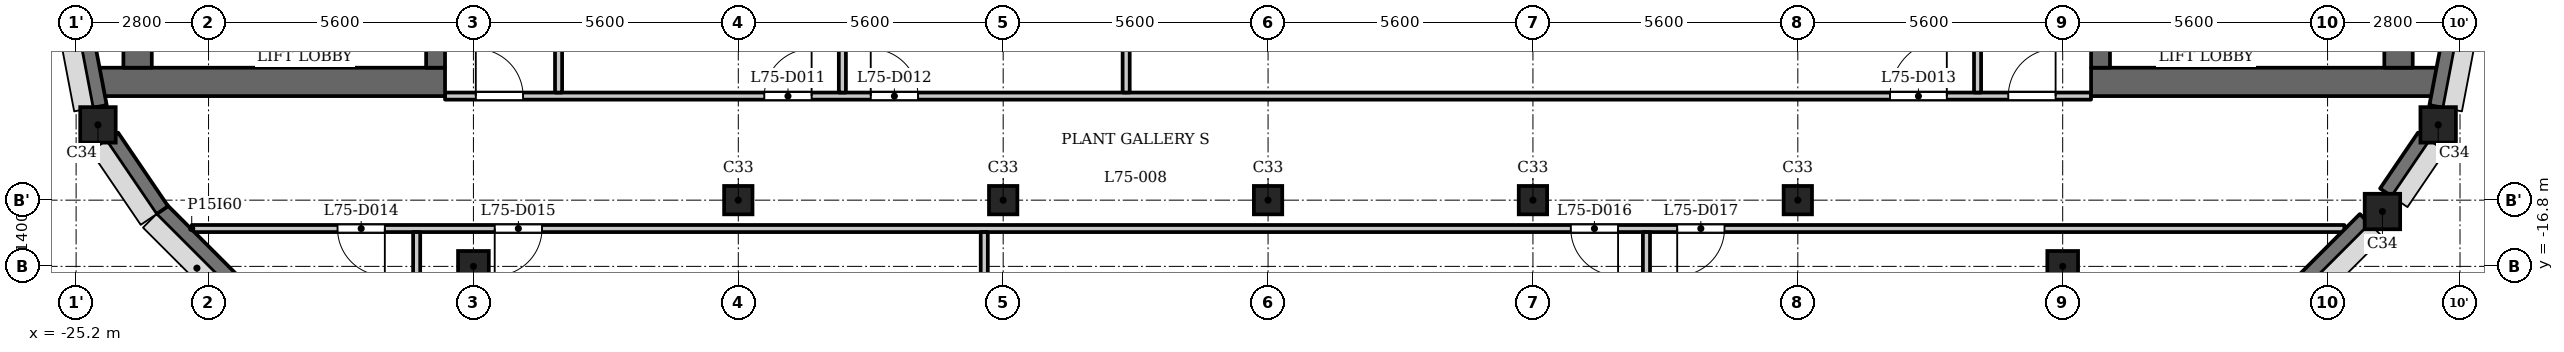
"""IFC4 building model, lengths in metres.
Left out: names, types, materials, properties, quantities, classifications, styles, units other than length and angle.
Written with IfcOpenShell. Run it as: python <this file> out.ifc"""

import sys

from ifc_helpers import new_model, si_unit, direction, frame, frame_2d, origin, origin_2d, place, context, subcontext, project, spatial, rectangle, extrude, element, fill, save


model = new_model("IFC4")
c1 = context("Model", 3, precision=1e-05, world=origin(), true_north=direction((0.0, 1.0)))
c2 = subcontext(c1, "Body", "Model", "MODEL_VIEW")
j1 = project(units=[si_unit("LENGTHUNIT", "METRE"), si_unit("PLANEANGLEUNIT", "RADIAN")], contexts=[c1])
p1 = place(None, origin())
s1 = spatial("IfcSite", under=j1, at=p1, CompositionType="ELEMENT")
p2 = place(p1, origin())
s2 = spatial("IfcBuilding", under=s1, at=p2, CompositionType="ELEMENT")
p3 = place(p2, frame((0.0, 0.0, 289.1)))
s3 = spatial("IfcBuildingStorey", under=s2, at=p3, CompositionType="ELEMENT", Elevation=289.1)
for number, where, z_axis, x_axis in (
    (1, (23.56, -15.64, 0.0), (0.0, 0.0, 1.0), (1.0, 0.0, 0.0)),
    (2, (24.738, -13.809, 0.0), (0.0, 0.0, 1.0), (1.0, 0.0, 0.0)),
    (3, (-24.738, -13.809, 0.0), (0.0, 0.0, 1.0), (1.0, 0.0, 0.0)),
):
    element("IfcColumn", number, at=place(p3, frame(where, z_axis=z_axis, x_axis=x_axis)), inside=s3, PredefinedType="COLUMN", context=c2, shape_type="SweptSolid", body=[
        extrude(rectangle(XDim=0.75, YDim=0.75, at=origin_2d()), origin(), (0.0, 0.0, 1.0), 5.4),
    ])
for number, where, z_axis, x_axis in (
    (4, (-16.8, -16.8, 0.0), (0.0, 0.0, 1.0), (1.0, 0.0, 0.0)),
    (5, (16.8, -16.8, 0.0), (0.0, 0.0, 1.0), (1.0, 0.0, 0.0)),
):
    element("IfcColumn", number, at=place(p3, frame(where, z_axis=z_axis, x_axis=x_axis)), inside=s3, PredefinedType="COLUMN", context=c2, shape_type="SweptSolid", body=[
        extrude(rectangle(XDim=0.65, YDim=0.65, at=origin_2d()), origin(), (0.0, 0.0, 1.0), 5.4),
    ])
for number, where, z_axis, x_axis in (
    (6, (-11.2, -15.4, 0.0), (0.0, 0.0, 1.0), (1.0, 0.0, 0.0)),
    (7, (-5.6, -15.4, 0.0), (0.0, 0.0, 1.0), (1.0, 0.0, 0.0)),
    (8, (0.0, -15.4, 0.0), (0.0, 0.0, 1.0), (1.0, 0.0, 0.0)),
    (9, (5.6, -15.4, 0.0), (0.0, 0.0, 1.0), (1.0, 0.0, 0.0)),
    (10, (11.2, -15.4, 0.0), (0.0, 0.0, 1.0), (1.0, 0.0, 0.0)),
):
    element("IfcColumn", number, at=place(p3, frame(where, z_axis=z_axis, x_axis=x_axis)), inside=s3, PredefinedType="COLUMN", context=c2, shape_type="SweptSolid", body=[
        extrude(rectangle(XDim=0.6, YDim=0.6, at=origin_2d()), origin(), (0.0, 0.0, 1.0), 5.4),
    ])
for number, where, z_axis, x_axis in (
    (11, (-23.397, -15.591, 0.0), (0.0, 0.0, 1.0), (0.707, -0.707, 0.0)),
    (12, (21.191, -17.797, 0.0), (0.0, 0.0, 1.0), (0.707, 0.707, 0.0)),
):
    element("IfcWall", number, at=place(p3, frame(where, z_axis=z_axis, x_axis=x_axis)), inside=s3, PredefinedType="SOLIDWALL", context=c2, shape_type="SweptSolid", body=[
        extrude(rectangle(XDim=2.825, YDim=0.3, at=frame_2d((1.413, 0.0))), origin(), (0.0, 0.0, 1.0), 3.2),
    ])
p4 = place(p3, frame((23.634, -15.237, 0.0), z_axis=(0.0, 0.0, 1.0), x_axis=(0.562099454787, 0.827069648173, 0.0)))
e13 = element("IfcWall", 13, at=p4, inside=s3, PredefinedType="SOLIDWALL", context=c2, shape_type="SweptSolid", body=[
    extrude(rectangle(XDim=1.427, YDim=0.3, at=frame_2d((0.714, 0.0))), origin(), (0.0, 0.0, 1.0), 3.2),
])
for number, where, z_axis, x_axis in (
    (14, (24.7, -13.42, 0.0), (0.0, 0.0, 1.0), (0.187, 0.982, 0.0)),
    (15, (-25.053, -11.572, 0.0), (0.0, 0.0, 1.0), (0.187, -0.982, 0.0)),
):
    element("IfcWall", number, at=place(p3, frame(where, z_axis=z_axis, x_axis=x_axis)), inside=s3, PredefinedType="SOLIDWALL", context=c2, shape_type="SweptSolid", body=[
        extrude(rectangle(XDim=1.881, YDim=0.3, at=frame_2d((0.941, 0.0))), origin(), (0.0, 0.0, 1.0), 3.2),
    ])
p5 = place(p3, frame((-24.436, -14.057, 0.0), z_axis=(0.0, 0.0, 1.0), x_axis=(0.562075713892, -0.827085782645, 0.0)))
e16 = element("IfcWall", 16, at=p5, inside=s3, PredefinedType="SOLIDWALL", context=c2, shape_type="SweptSolid", body=[
    extrude(rectangle(XDim=1.881, YDim=0.3, at=frame_2d((0.94, 0.0))), origin(), (0.0, 0.0, 1.0), 3.2),
])
p6 = place(p3, frame((-17.4, -12.9, 0.0), z_axis=(0.0, 0.0, 1.0), x_axis=(-1.0, 0.0, 0.0)))
e17 = element("IfcWall", 17, at=p6, inside=s3, PredefinedType="SHEAR", context=c2, shape_type="SweptSolid", body=[
    extrude(rectangle(XDim=7.32, YDim=0.6, at=frame_2d((3.66, 0.0))), origin(), (0.0, 0.0, 1.0), 5.0),
])
p7 = place(p3, frame((-17.6, -12.6, 0.0), z_axis=(0.0, 0.0, 1.0), x_axis=(0.0, 1.0, 0.0)))
e18 = element("IfcWall", 18, at=p7, inside=s3, PredefinedType="SHEAR", context=c2, shape_type="SweptSolid", body=[
    extrude(rectangle(XDim=25.2, YDim=0.4, at=frame_2d((12.6, 0.0))), origin(), (0.0, 0.0, 1.0), 5.0),
])
p8 = place(p7, frame((6.3, 0.0, 0.0)))
e19 = element("IfcOpeningElement", 19, at=p8, cuts=e18, PredefinedType="OPENING", context=c2, shape_type="SweptSolid", body=[
    extrude(rectangle(XDim=1.1, YDim=2.1, at=frame_2d((0.55, 1.05))), frame((0.0, 0.21, 0.0), z_axis=(0.0, -1.0, 0.0), x_axis=(1.0, 0.0, 0.0)), (0.0, 0.0, 1.0), 0.42),
])
p9 = place(p7, frame((8.7, 0.0, 0.0)))
e20 = element("IfcOpeningElement", 20, at=p9, cuts=e18, PredefinedType="OPENING", context=c2, shape_type="SweptSolid", body=[
    extrude(rectangle(XDim=1.1, YDim=2.1, at=frame_2d((0.55, 1.05))), frame((0.0, 0.21, 0.0), z_axis=(0.0, -1.0, 0.0), x_axis=(1.0, 0.0, 0.0)), (0.0, 0.0, 1.0), 0.42),
])
p10 = place(p7, frame((11.2, 0.0, 0.0)))
e21 = element("IfcOpeningElement", 21, at=p10, cuts=e18, PredefinedType="OPENING", context=c2, shape_type="SweptSolid", body=[
    extrude(rectangle(XDim=0.9, YDim=2.1, at=frame_2d((0.45, 1.05))), frame((0.0, 0.21, 0.0), z_axis=(0.0, -1.0, 0.0), x_axis=(1.0, 0.0, 0.0)), (0.0, 0.0, 1.0), 0.42),
])
p11 = place(p7, frame((17.05, 0.0, 0.0)))
e22 = element("IfcOpeningElement", 22, at=p11, cuts=e18, PredefinedType="OPENING", context=c2, shape_type="SweptSolid", body=[
    extrude(rectangle(XDim=0.9, YDim=2.1, at=frame_2d((0.45, 1.05))), frame((0.0, 0.21, 0.0), z_axis=(0.0, -1.0, 0.0), x_axis=(1.0, 0.0, 0.0)), (0.0, 0.0, 1.0), 0.42),
])
p12 = place(p7, frame((23.25, 0.0, 0.0)))
e23 = element("IfcOpeningElement", 23, at=p12, cuts=e18, PredefinedType="OPENING", context=c2, shape_type="SweptSolid", body=[
    extrude(rectangle(XDim=1.1, YDim=2.1, at=frame_2d((0.55, 1.05))), frame((0.0, 0.21, 0.0), z_axis=(0.0, -1.0, 0.0), x_axis=(1.0, 0.0, 0.0)), (0.0, 0.0, 1.0), 0.42),
])
p13 = place(p7, frame((0.85, 0.0, 0.0)))
e24 = element("IfcOpeningElement", 24, at=p13, cuts=e18, PredefinedType="OPENING", context=c2, shape_type="SweptSolid", body=[
    extrude(rectangle(XDim=1.1, YDim=2.1, at=frame_2d((0.55, 1.05))), frame((0.0, 0.21, 0.0), z_axis=(0.0, -1.0, 0.0), x_axis=(1.0, 0.0, 0.0)), (0.0, 0.0, 1.0), 0.42),
])
p14 = place(p7, frame((13.075, 0.0, 0.0)))
e25 = element("IfcOpeningElement", 25, at=p14, cuts=e18, PredefinedType="OPENING", context=c2, shape_type="SweptSolid", body=[
    extrude(rectangle(XDim=1.8, YDim=2.1, at=frame_2d((0.9, 1.05))), frame((0.0, 0.21, 0.0), z_axis=(0.0, -1.0, 0.0), x_axis=(1.0, 0.0, 0.0)), (0.0, 0.0, 1.0), 0.42),
])
p15 = place(p3, frame((-23.9, -12.6, 0.0), z_axis=(0.0, 0.0, 1.0), x_axis=(0.0, 1.0, 0.0)))
e26 = element("IfcWall", 26, at=p15, inside=s3, PredefinedType="SHEAR", context=c2, shape_type="SweptSolid", body=[
    extrude(rectangle(XDim=25.2, YDim=0.6, at=frame_2d((12.6, 0.0))), origin(), (0.0, 0.0, 1.0), 5.0),
])
p16 = place(p3, frame((17.4, -12.9, 0.0), z_axis=(0.0, 0.0, 1.0), x_axis=(1.0, 0.0, 0.0)))
e27 = element("IfcWall", 27, at=p16, inside=s3, PredefinedType="SHEAR", context=c2, shape_type="SweptSolid", body=[
    extrude(rectangle(XDim=7.32, YDim=0.6, at=frame_2d((3.66, 0.0))), origin(), (0.0, 0.0, 1.0), 5.0),
])
p17 = place(p3, frame((17.6, -12.6, 0.0), z_axis=(0.0, 0.0, 1.0), x_axis=(0.0, 1.0, 0.0)))
e28 = element("IfcWall", 28, at=p17, inside=s3, PredefinedType="SHEAR", context=c2, shape_type="SweptSolid", body=[
    extrude(rectangle(XDim=25.2, YDim=0.4, at=frame_2d((12.6, 0.0))), origin(), (0.0, 0.0, 1.0), 5.0),
])
p18 = place(p17, frame((6.3, 0.0, 0.0)))
e29 = element("IfcOpeningElement", 29, at=p18, cuts=e28, PredefinedType="OPENING", context=c2, shape_type="SweptSolid", body=[
    extrude(rectangle(XDim=1.1, YDim=2.1, at=frame_2d((0.55, 1.05))), frame((0.0, 0.21, 0.0), z_axis=(0.0, -1.0, 0.0), x_axis=(1.0, 0.0, 0.0)), (0.0, 0.0, 1.0), 0.42),
])
p19 = place(p17, frame((8.7, 0.0, 0.0)))
e30 = element("IfcOpeningElement", 30, at=p19, cuts=e28, PredefinedType="OPENING", context=c2, shape_type="SweptSolid", body=[
    extrude(rectangle(XDim=1.1, YDim=2.1, at=frame_2d((0.55, 1.05))), frame((0.0, 0.21, 0.0), z_axis=(0.0, -1.0, 0.0), x_axis=(1.0, 0.0, 0.0)), (0.0, 0.0, 1.0), 0.42),
])
p20 = place(p17, frame((11.2, 0.0, 0.0)))
e31 = element("IfcOpeningElement", 31, at=p20, cuts=e28, PredefinedType="OPENING", context=c2, shape_type="SweptSolid", body=[
    extrude(rectangle(XDim=0.9, YDim=2.1, at=frame_2d((0.45, 1.05))), frame((0.0, 0.21, 0.0), z_axis=(0.0, -1.0, 0.0), x_axis=(1.0, 0.0, 0.0)), (0.0, 0.0, 1.0), 0.42),
])
p21 = place(p17, frame((17.05, 0.0, 0.0)))
e32 = element("IfcOpeningElement", 32, at=p21, cuts=e28, PredefinedType="OPENING", context=c2, shape_type="SweptSolid", body=[
    extrude(rectangle(XDim=0.9, YDim=2.1, at=frame_2d((0.45, 1.05))), frame((0.0, 0.21, 0.0), z_axis=(0.0, -1.0, 0.0), x_axis=(1.0, 0.0, 0.0)), (0.0, 0.0, 1.0), 0.42),
])
p22 = place(p17, frame((23.25, 0.0, 0.0)))
e33 = element("IfcOpeningElement", 33, at=p22, cuts=e28, PredefinedType="OPENING", context=c2, shape_type="SweptSolid", body=[
    extrude(rectangle(XDim=1.1, YDim=2.1, at=frame_2d((0.55, 1.05))), frame((0.0, 0.21, 0.0), z_axis=(0.0, -1.0, 0.0), x_axis=(1.0, 0.0, 0.0)), (0.0, 0.0, 1.0), 0.42),
])
p23 = place(p17, frame((0.85, 0.0, 0.0)))
e34 = element("IfcOpeningElement", 34, at=p23, cuts=e28, PredefinedType="OPENING", context=c2, shape_type="SweptSolid", body=[
    extrude(rectangle(XDim=1.1, YDim=2.1, at=frame_2d((0.55, 1.05))), frame((0.0, 0.21, 0.0), z_axis=(0.0, -1.0, 0.0), x_axis=(1.0, 0.0, 0.0)), (0.0, 0.0, 1.0), 0.42),
])
p24 = place(p17, frame((13.075, 0.0, 0.0)))
e35 = element("IfcOpeningElement", 35, at=p24, cuts=e28, PredefinedType="OPENING", context=c2, shape_type="SweptSolid", body=[
    extrude(rectangle(XDim=1.8, YDim=2.1, at=frame_2d((0.9, 1.05))), frame((0.0, 0.21, 0.0), z_axis=(0.0, -1.0, 0.0), x_axis=(1.0, 0.0, 0.0)), (0.0, 0.0, 1.0), 0.42),
])
p25 = place(p3, frame((23.9, -12.6, 0.0), z_axis=(0.0, 0.0, 1.0), x_axis=(0.0, 1.0, 0.0)))
e36 = element("IfcWall", 36, at=p25, inside=s3, PredefinedType="SHEAR", context=c2, shape_type="SweptSolid", body=[
    extrude(rectangle(XDim=25.2, YDim=0.6, at=frame_2d((12.6, 0.0))), origin(), (0.0, 0.0, 1.0), 5.0),
])
p26 = place(p3, frame((-22.756, -16.0, 0.0), z_axis=(0.0, 0.0, 1.0), x_axis=(1.0, 0.0, 0.0)))
e37 = element("IfcWall", 37, at=p26, inside=s3, PredefinedType="PARTITIONING", context=c2, shape_type="SweptSolid", body=[
    extrude(rectangle(XDim=45.511, YDim=0.15, at=frame_2d((22.756, 0.0))), origin(), (0.0, 0.0, 1.0), 5.0),
])
p27 = place(p26, frame((3.083, 0.0, 0.0)))
e38 = element("IfcOpeningElement", 38, at=p27, cuts=e37, PredefinedType="OPENING", context=c2, shape_type="SweptSolid", body=[
    extrude(rectangle(XDim=1.0, YDim=2.1, at=frame_2d((0.5, 1.05))), frame((0.0, 0.085, 0.0), z_axis=(0.0, -1.0, 0.0), x_axis=(1.0, 0.0, 0.0)), (0.0, 0.0, 1.0), 0.17),
])
p28 = place(p26, frame((6.406, 0.0, 0.0)))
e39 = element("IfcOpeningElement", 39, at=p28, cuts=e37, PredefinedType="OPENING", context=c2, shape_type="SweptSolid", body=[
    extrude(rectangle(XDim=1.0, YDim=2.1, at=frame_2d((0.5, 1.05))), frame((0.0, 0.085, 0.0), z_axis=(0.0, -1.0, 0.0), x_axis=(1.0, 0.0, 0.0)), (0.0, 0.0, 1.0), 0.17),
])
p29 = place(p26, frame((29.156, 0.0, 0.0)))
e40 = element("IfcOpeningElement", 40, at=p29, cuts=e37, PredefinedType="OPENING", context=c2, shape_type="SweptSolid", body=[
    extrude(rectangle(XDim=1.0, YDim=2.1, at=frame_2d((0.5, 1.05))), frame((0.0, 0.085, 0.0), z_axis=(0.0, -1.0, 0.0), x_axis=(1.0, 0.0, 0.0)), (0.0, 0.0, 1.0), 0.17),
])
p30 = place(p26, frame((31.406, 0.0, 0.0)))
e41 = element("IfcOpeningElement", 41, at=p30, cuts=e37, PredefinedType="OPENING", context=c2, shape_type="SweptSolid", body=[
    extrude(rectangle(XDim=1.0, YDim=2.1, at=frame_2d((0.5, 1.05))), frame((0.0, 0.085, 0.0), z_axis=(0.0, -1.0, 0.0), x_axis=(1.0, 0.0, 0.0)), (0.0, 0.0, 1.0), 0.17),
])
p31 = place(p3, frame((-17.4, -13.2, 0.0), z_axis=(0.0, 0.0, 1.0), x_axis=(1.0, 0.0, 0.0)))
e42 = element("IfcWall", 42, at=p31, inside=s3, PredefinedType="PARTITIONING", context=c2, shape_type="SweptSolid", body=[
    extrude(rectangle(XDim=34.8, YDim=0.15, at=frame_2d((17.4, 0.0))), origin(), (0.0, 0.0, 1.0), 5.0),
])
p32 = place(p31, frame((0.65, 0.0, 0.0)))
e43 = element("IfcOpeningElement", 43, at=p32, cuts=e42, PredefinedType="OPENING", context=c2, shape_type="SweptSolid", body=[
    extrude(rectangle(XDim=1.0, YDim=2.1, at=frame_2d((0.5, 1.05))), frame((0.0, 0.085, 0.0), z_axis=(0.0, -1.0, 0.0), x_axis=(1.0, 0.0, 0.0)), (0.0, 0.0, 1.0), 0.17),
])
p33 = place(p31, frame((33.05, 0.0, 0.0)))
e44 = element("IfcOpeningElement", 44, at=p33, cuts=e42, PredefinedType="OPENING", context=c2, shape_type="SweptSolid", body=[
    extrude(rectangle(XDim=1.0, YDim=2.1, at=frame_2d((0.5, 1.05))), frame((0.0, 0.085, 0.0), z_axis=(0.0, -1.0, 0.0), x_axis=(1.0, 0.0, 0.0)), (0.0, 0.0, 1.0), 0.17),
])
p34 = place(p31, frame((6.75, 0.0, 0.0)))
e45 = element("IfcOpeningElement", 45, at=p34, cuts=e42, PredefinedType="OPENING", context=c2, shape_type="SweptSolid", body=[
    extrude(rectangle(XDim=1.0, YDim=2.1, at=frame_2d((0.5, 1.05))), frame((0.0, 0.085, 0.0), z_axis=(0.0, -1.0, 0.0), x_axis=(1.0, 0.0, 0.0)), (0.0, 0.0, 1.0), 0.17),
])
p35 = place(p31, frame((9.0, 0.0, 0.0)))
e46 = element("IfcOpeningElement", 46, at=p35, cuts=e42, PredefinedType="OPENING", context=c2, shape_type="SweptSolid", body=[
    extrude(rectangle(XDim=1.0, YDim=2.1, at=frame_2d((0.5, 1.05))), frame((0.0, 0.085, 0.0), z_axis=(0.0, -1.0, 0.0), x_axis=(1.0, 0.0, 0.0)), (0.0, 0.0, 1.0), 0.17),
])
p36 = place(p31, frame((30.55, 0.0, 0.0)))
e47 = element("IfcOpeningElement", 47, at=p36, cuts=e42, PredefinedType="OPENING", context=c2, shape_type="SweptSolid", body=[
    extrude(rectangle(XDim=1.2, YDim=2.1, at=frame_2d((0.6, 1.05))), frame((0.0, 0.085, 0.0), z_axis=(0.0, -1.0, 0.0), x_axis=(1.0, 0.0, 0.0)), (0.0, 0.0, 1.0), 0.17),
])
p37 = place(p3, frame((-18.0, -19.122, 0.0), z_axis=(0.0, 0.0, 1.0), x_axis=(0.0, 1.0, 0.0)))
e48 = element("IfcWall", 48, at=p37, inside=s3, PredefinedType="PARTITIONING", context=c2, shape_type="SweptSolid", body=[
    extrude(rectangle(XDim=3.047, YDim=0.15, at=frame_2d((1.523, 0.0))), origin(), (0.0, 0.0, 1.0), 5.0),
])
p38 = place(p3, frame((-15.0, -13.125, 0.0), z_axis=(0.0, 0.0, 1.0), x_axis=(0.0, 1.0, 0.0)))
e49 = element("IfcWall", 49, at=p38, inside=s3, PredefinedType="PARTITIONING", context=c2, shape_type="SweptSolid", body=[
    extrude(rectangle(XDim=6.356, YDim=0.15, at=frame_2d((3.178, 0.0))), origin(), (0.0, 0.0, 1.0), 5.0),
])
p39 = place(p3, frame((-9.0, -13.125, 0.0), z_axis=(0.0, 0.0, 1.0), x_axis=(0.0, 1.0, 0.0)))
e50 = element("IfcWall", 50, at=p39, inside=s3, PredefinedType="PARTITIONING", context=c2, shape_type="SweptSolid", body=[
    extrude(rectangle(XDim=5.805, YDim=0.15, at=frame_2d((2.902, 0.0))), origin(), (0.0, 0.0, 1.0), 5.0),
])
p40 = place(p3, frame((-6.0, -19.28, 0.0), z_axis=(0.0, 0.0, 1.0), x_axis=(0.0, 1.0, 0.0)))
e51 = element("IfcWall", 51, at=p40, inside=s3, PredefinedType="PARTITIONING", context=c2, shape_type="SweptSolid", body=[
    extrude(rectangle(XDim=3.205, YDim=0.15, at=frame_2d((1.603, 0.0))), origin(), (0.0, 0.0, 1.0), 5.0),
])
p41 = place(p3, frame((-3.0, -13.125, 0.0), z_axis=(0.0, 0.0, 1.0), x_axis=(0.0, 1.0, 0.0)))
e52 = element("IfcWall", 52, at=p41, inside=s3, PredefinedType="PARTITIONING", context=c2, shape_type="SweptSolid", body=[
    extrude(rectangle(XDim=5.805, YDim=0.15, at=frame_2d((2.902, 0.0))), origin(), (0.0, 0.0, 1.0), 3.8),
])
p42 = place(p3, frame((8.0, -19.28, 0.0), z_axis=(0.0, 0.0, 1.0), x_axis=(0.0, 1.0, 0.0)))
e53 = element("IfcWall", 53, at=p42, inside=s3, PredefinedType="PARTITIONING", context=c2, shape_type="SweptSolid", body=[
    extrude(rectangle(XDim=3.205, YDim=0.15, at=frame_2d((1.603, 0.0))), origin(), (0.0, 0.0, 1.0), 5.0),
])
p43 = place(p3, frame((15.0, -13.125, 0.0), z_axis=(0.0, 0.0, 1.0), x_axis=(0.0, 1.0, 0.0)))
e54 = element("IfcWall", 54, at=p43, inside=s3, PredefinedType="PARTITIONING", context=c2, shape_type="SweptSolid", body=[
    extrude(rectangle(XDim=6.356, YDim=0.15, at=frame_2d((3.178, 0.0))), origin(), (0.0, 0.0, 1.0), 5.0),
])
p44 = place(p32, origin())
e55 = element("IfcDoor", 55, at=p44, inside=s3, OperationType="SINGLE_SWING_RIGHT", PredefinedType="DOOR", context=c2, shape_type="SweptSolid", body=[
    extrude(rectangle(XDim=1.0, YDim=2.1, at=frame_2d((0.5, 1.05))), frame((0.0, 0.025, 0.0), z_axis=(0.0, -1.0, 0.0), x_axis=(1.0, 0.0, 0.0)), (0.0, 0.0, 1.0), 0.05),
])
fill(e43, e55)
p45 = place(p33, origin())
e56 = element("IfcDoor", 56, at=p45, inside=s3, OperationType="SINGLE_SWING_LEFT", PredefinedType="DOOR", context=c2, shape_type="SweptSolid", body=[
    extrude(rectangle(XDim=1.0, YDim=2.1, at=frame_2d((0.5, 1.05))), frame((0.0, 0.025, 0.0), z_axis=(0.0, -1.0, 0.0), x_axis=(1.0, 0.0, 0.0)), (0.0, 0.0, 1.0), 0.05),
])
fill(e44, e56)
p46 = place(p34, origin())
e57 = element("IfcDoor", 57, at=p46, inside=s3, OperationType="SINGLE_SWING_LEFT", PredefinedType="DOOR", context=c2, shape_type="SweptSolid", body=[
    extrude(rectangle(XDim=1.0, YDim=2.1, at=frame_2d((0.5, 1.05))), frame((0.0, 0.025, 0.0), z_axis=(0.0, -1.0, 0.0), x_axis=(1.0, 0.0, 0.0)), (0.0, 0.0, 1.0), 0.05),
])
fill(e45, e57)
p47 = place(p35, origin())
e58 = element("IfcDoor", 58, at=p47, inside=s3, OperationType="SINGLE_SWING_RIGHT", PredefinedType="DOOR", context=c2, shape_type="SweptSolid", body=[
    extrude(rectangle(XDim=1.0, YDim=2.1, at=frame_2d((0.5, 1.05))), frame((0.0, 0.025, 0.0), z_axis=(0.0, -1.0, 0.0), x_axis=(1.0, 0.0, 0.0)), (0.0, 0.0, 1.0), 0.05),
])
fill(e46, e58)
p48 = place(p36, origin())
e59 = element("IfcDoor", 59, at=p48, inside=s3, OperationType="SINGLE_SWING_LEFT", PredefinedType="DOOR", context=c2, shape_type="SweptSolid", body=[
    extrude(rectangle(XDim=1.2, YDim=2.1, at=frame_2d((0.6, 1.05))), frame((0.0, 0.025, 0.0), z_axis=(0.0, -1.0, 0.0), x_axis=(1.0, 0.0, 0.0)), (0.0, 0.0, 1.0), 0.05),
])
fill(e47, e59)
p49 = place(p27, origin())
e60 = element("IfcDoor", 60, at=p49, inside=s3, OperationType="SINGLE_SWING_RIGHT", PredefinedType="DOOR", context=c2, shape_type="SweptSolid", body=[
    extrude(rectangle(XDim=1.0, YDim=2.1, at=frame_2d((0.5, 1.05))), frame((0.0, 0.025, 0.0), z_axis=(0.0, -1.0, 0.0), x_axis=(1.0, 0.0, 0.0)), (0.0, 0.0, 1.0), 0.05),
])
fill(e38, e60)
p50 = place(p28, origin())
e61 = element("IfcDoor", 61, at=p50, inside=s3, OperationType="SINGLE_SWING_LEFT", PredefinedType="DOOR", context=c2, shape_type="SweptSolid", body=[
    extrude(rectangle(XDim=1.0, YDim=2.1, at=frame_2d((0.5, 1.05))), frame((0.0, 0.025, 0.0), z_axis=(0.0, -1.0, 0.0), x_axis=(1.0, 0.0, 0.0)), (0.0, 0.0, 1.0), 0.05),
])
fill(e39, e61)
p51 = place(p29, origin())
e62 = element("IfcDoor", 62, at=p51, inside=s3, OperationType="SINGLE_SWING_RIGHT", PredefinedType="DOOR", context=c2, shape_type="SweptSolid", body=[
    extrude(rectangle(XDim=1.0, YDim=2.1, at=frame_2d((0.5, 1.05))), frame((0.0, 0.025, 0.0), z_axis=(0.0, -1.0, 0.0), x_axis=(1.0, 0.0, 0.0)), (0.0, 0.0, 1.0), 0.05),
])
fill(e40, e62)
p52 = place(p30, origin())
e63 = element("IfcDoor", 63, at=p52, inside=s3, OperationType="SINGLE_SWING_LEFT", PredefinedType="DOOR", context=c2, shape_type="SweptSolid", body=[
    extrude(rectangle(XDim=1.0, YDim=2.1, at=frame_2d((0.5, 1.05))), frame((0.0, 0.025, 0.0), z_axis=(0.0, -1.0, 0.0), x_axis=(1.0, 0.0, 0.0)), (0.0, 0.0, 1.0), 0.05),
])
fill(e41, e63)
save(model, sys.argv[1])
